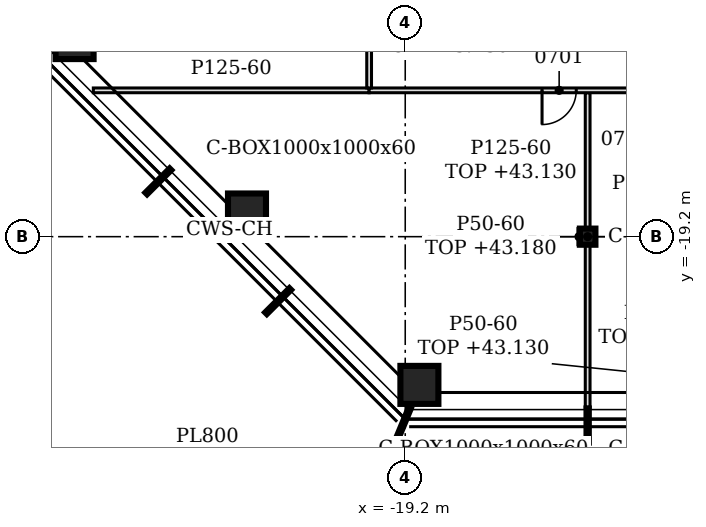
"""IFC4 building model, lengths in metres.
Left out: names, types, materials, properties, quantities, classifications, styles, units other than length and angle.
Written with IfcOpenShell. Run it as: python <this file> out.ifc"""

import sys

from ifc_helpers import new_model, si_unit, direction, frame, frame_2d, origin, origin_2d, place, context, subcontext, project, spatial, polyline, rectangle, hollow_rectangle, i_section, outline, extrude, element, fill, save


model = new_model("IFC4")
c1 = context("Model", 3, precision=1e-05, world=origin(), true_north=direction((0.0, 1.0)))
c2 = subcontext(c1, "Body", "Model", "MODEL_VIEW")
j1 = project(units=[si_unit("LENGTHUNIT", "METRE"), si_unit("PLANEANGLEUNIT", "RADIAN")], contexts=[c1])
p1 = place(None, origin())
s1 = spatial("IfcSite", under=j1, at=p1, CompositionType="ELEMENT")
p2 = place(p1, origin())
s2 = spatial("IfcBuilding", under=s1, at=p2, CompositionType="ELEMENT")
p3 = place(p2, frame((0.0, 0.0, 40.2)))
s3 = spatial("IfcBuildingStorey", under=s2, at=p3, CompositionType="ELEMENT", Elevation=40.2)
for number, where, z_axis, x_axis in (
    (1, (-18.827, -23.1, -0.15), (0.0, 0.0, 1.0), (1.0, 0.0, 0.0)),
    (2, (-27.9, -14.027, -0.15), (0.0, 0.0, 1.0), (1.0, 0.0, 0.0)),
    (3, (-23.364, -18.564, -0.15), (0.0, 0.0, 1.0), (1.0, 0.0, 0.0)),
):
    element("IfcColumn", number, at=place(p3, frame(where, z_axis=z_axis, x_axis=x_axis)), inside=s3, PredefinedType="COLUMN", context=c2, shape_type="SweptSolid", body=[
        extrude(hollow_rectangle(XDim=1.0, YDim=1.0, WallThickness=0.06, at=origin_2d()), origin(), (0.0, 0.0, 1.0), 3.6),
    ])
p4 = place(p3, frame((-14.4, -19.2, -0.15), z_axis=(0.0, 0.0, 1.0), x_axis=(1.0, 0.0, 0.0)))
e4 = element("IfcColumn", 4, at=p4, inside=s3, PredefinedType="COLUMN", context=c2, shape_type="SweptSolid", body=[
    extrude(i_section(OverallWidth=0.409, OverallDepth=0.425, WebThickness=0.033, FlangeThickness=0.052, FilletRadius=0.015, at=origin_2d()), origin(), (0.0, 0.0, 1.0), 3.6),
])
p5 = place(p3, frame((-14.4, -23.69, 0.0), z_axis=(0.0, 0.0, 1.0), x_axis=(0.0, 1.0, 0.0)))
e5 = element("IfcWall", 5, at=p5, inside=s3, PredefinedType="PARTITIONING", context=c2, shape_type="SweptSolid", body=[
    extrude(outline(polyline([(0.0, 0.0), (4.277, 0.0), (4.278, 3.03), (0.74, 3.03), (0.738, 2.93), (0.44, 2.93), (0.438, 3.03), (0.0, 3.03), (0.0, 0.0)])), frame((0.0, 0.062, 0.0), z_axis=(0.0, -1.0, 0.0), x_axis=(1.0, 0.0, 0.0)), (0.0, 0.0, 1.0), 0.125),
])
p6 = place(p3, frame((-14.4, -18.988, 0.0), z_axis=(0.0, 0.0, 1.0), x_axis=(0.0, 1.0, 0.0)))
e6 = element("IfcWall", 6, at=p6, inside=s3, PredefinedType="PARTITIONING", context=c2, shape_type="SweptSolid", body=[
    extrude(rectangle(XDim=3.575, YDim=0.125, at=frame_2d((1.788, 0.0))), origin(), (0.0, 0.0, 1.0), 2.93),
])
p7 = place(p3, frame((-27.407, -15.35, 0.0), z_axis=(0.0, 0.0, 1.0), x_axis=(1.0, 0.0, 0.0)))
e7 = element("IfcWall", 7, at=p7, inside=s3, PredefinedType="PARTITIONING", context=c2, shape_type="SweptSolid", body=[
    extrude(outline(polyline([(0.0, 0.0), (7.257, 0.0), (7.257, 3.45), (1.104, 3.45), (1.102, 2.93), (0.555, 2.93), (0.553, 3.45), (0.0, 3.45), (0.0, 0.0)])), frame((0.0, 0.062, 0.0), z_axis=(0.0, -1.0, 0.0), x_axis=(1.0, 0.0, 0.0)), (0.0, 0.0, 1.0), 0.125),
])
p8 = place(p3, frame((-20.15, -15.35, 0.0), z_axis=(0.0, 0.0, 1.0), x_axis=(1.0, 0.0, 0.0)))
e8 = element("IfcWall", 8, at=p8, inside=s3, PredefinedType="PARTITIONING", context=c2, shape_type="SweptSolid", body=[
    extrude(outline(polyline([(0.0, 0.0), (39.287, 0.0), (39.288, 2.73), (39.2, 2.73), (39.198, 3.45), (27.5, 3.45), (27.498, 2.73), (27.2, 2.73), (27.198, 3.45), (15.5, 3.45), (15.498, 2.73), (15.2, 2.73), (15.198, 3.45), (5.9, 3.45), (5.898, 2.93), (5.6, 2.93), (5.598, 3.45), (0.0, 3.45), (0.0, 0.0)])), frame((0.0, 0.062, 0.0), z_axis=(0.0, -1.0, 0.0), x_axis=(1.0, 0.0, 0.0)), (0.0, 0.0, 1.0), 0.125),
])
p9 = place(p8, frame((4.55, 0.0, 0.0)))
e9 = element("IfcOpeningElement", 9, at=p9, cuts=e8, PredefinedType="OPENING", context=c2, shape_type="SweptSolid", body=[
    extrude(rectangle(XDim=0.9, YDim=2.1, at=frame_2d((0.45, 1.05))), frame((0.0, 0.073, 0.0), z_axis=(0.0, -1.0, 0.0), x_axis=(1.0, 0.0, 0.0)), (0.0, 0.0, 1.0), 0.145),
])
p10 = place(p8, frame((7.136, 0.0, 0.0)))
e10 = element("IfcOpeningElement", 10, at=p10, cuts=e8, PredefinedType="OPENING", context=c2, shape_type="SweptSolid", body=[
    extrude(rectangle(XDim=0.9, YDim=2.1, at=frame_2d((0.45, 1.05))), frame((0.0, 0.073, 0.0), z_axis=(0.0, -1.0, 0.0), x_axis=(1.0, 0.0, 0.0)), (0.0, 0.0, 1.0), 0.145),
])
p11 = place(p8, frame((14.15, 0.0, 0.0)))
e11 = element("IfcOpeningElement", 11, at=p11, cuts=e8, PredefinedType="OPENING", context=c2, shape_type="SweptSolid", body=[
    extrude(rectangle(XDim=0.9, YDim=2.1, at=frame_2d((0.45, 1.05))), frame((0.0, 0.073, 0.0), z_axis=(0.0, -1.0, 0.0), x_axis=(1.0, 0.0, 0.0)), (0.0, 0.0, 1.0), 0.145),
])
p12 = place(p8, frame((16.55, 0.0, 0.0)))
e12 = element("IfcOpeningElement", 12, at=p12, cuts=e8, PredefinedType="OPENING", context=c2, shape_type="SweptSolid", body=[
    extrude(rectangle(XDim=0.9, YDim=2.1, at=frame_2d((0.45, 1.05))), frame((0.0, 0.073, 0.0), z_axis=(0.0, -1.0, 0.0), x_axis=(1.0, 0.0, 0.0)), (0.0, 0.0, 1.0), 0.145),
])
p13 = place(p8, frame((21.35, 0.0, 0.0)))
e13 = element("IfcOpeningElement", 13, at=p13, cuts=e8, PredefinedType="OPENING", context=c2, shape_type="SweptSolid", body=[
    extrude(rectangle(XDim=0.9, YDim=2.1, at=frame_2d((0.45, 1.05))), frame((0.0, 0.073, 0.0), z_axis=(0.0, -1.0, 0.0), x_axis=(1.0, 0.0, 0.0)), (0.0, 0.0, 1.0), 0.145),
])
p14 = place(p8, frame((28.364, 0.0, 0.0)))
e14 = element("IfcOpeningElement", 14, at=p14, cuts=e8, PredefinedType="OPENING", context=c2, shape_type="SweptSolid", body=[
    extrude(rectangle(XDim=0.9, YDim=2.1, at=frame_2d((0.45, 1.05))), frame((0.0, 0.073, 0.0), z_axis=(0.0, -1.0, 0.0), x_axis=(1.0, 0.0, 0.0)), (0.0, 0.0, 1.0), 0.145),
])
p15 = place(p8, frame((32.35, 0.0, 0.0)))
e15 = element("IfcOpeningElement", 15, at=p15, cuts=e8, PredefinedType="OPENING", context=c2, shape_type="SweptSolid", body=[
    extrude(rectangle(XDim=0.9, YDim=2.1, at=frame_2d((0.45, 1.05))), frame((0.0, 0.073, 0.0), z_axis=(0.0, -1.0, 0.0), x_axis=(1.0, 0.0, 0.0)), (0.0, 0.0, 1.0), 0.145),
])
p16 = place(p8, frame((37.35, 0.0, 0.0)))
e16 = element("IfcOpeningElement", 16, at=p16, cuts=e8, PredefinedType="OPENING", context=c2, shape_type="SweptSolid", body=[
    extrude(rectangle(XDim=0.9, YDim=2.1, at=frame_2d((0.45, 1.05))), frame((0.0, 0.073, 0.0), z_axis=(0.0, -1.0, 0.0), x_axis=(1.0, 0.0, 0.0)), (0.0, 0.0, 1.0), 0.145),
])
p17 = place(p3, frame((-20.15, -15.288, 0.0), z_axis=(0.0, 0.0, 1.0), x_axis=(0.0, 1.0, 0.0)))
e17 = element("IfcWall", 17, at=p17, inside=s3, PredefinedType="PARTITIONING", context=c2, shape_type="SweptSolid", body=[
    extrude(outline(polyline([(0.0, 0.0), (37.876, 0.0), (37.876, 3.45), (37.622, 3.45), (37.62, 2.63), (36.507, 2.63), (36.505, 3.45), (34.583, 3.45), (34.581, 2.98), (34.393, 2.98), (34.39, 3.45), (29.798, 3.45), (29.795, 2.83), (29.577, 2.83), (29.575, 3.45), (24.998, 3.45), (24.996, 2.83), (24.778, 2.83), (24.775, 3.45), (20.198, 3.45), (20.196, 2.83), (19.978, 2.83), (19.976, 3.45), (15.397, 3.45), (15.396, 2.83), (15.177, 2.83), (15.176, 3.45), (10.597, 3.45), (10.595, 2.83), (10.377, 2.83), (10.375, 3.45), (5.798, 3.45), (5.795, 2.83), (5.577, 2.83), (5.575, 3.45), (0.998, 3.45), (0.996, 2.83), (0.778, 2.83), (0.775, 3.45), (0.0, 3.45), (0.0, 0.0)])), frame((0.0, 0.062, 0.0), z_axis=(0.0, -1.0, 0.0), x_axis=(1.0, 0.0, 0.0)), (0.0, 0.0, 1.0), 0.125),
])
p18 = place(p17, frame((9.337, 0.0, 0.0)))
e18 = element("IfcOpeningElement", 18, at=p18, cuts=e17, PredefinedType="OPENING", context=c2, shape_type="SweptSolid", body=[
    extrude(rectangle(XDim=0.9, YDim=2.1, at=frame_2d((0.45, 1.05))), frame((0.0, 0.073, 0.0), z_axis=(0.0, -1.0, 0.0), x_axis=(1.0, 0.0, 0.0)), (0.0, 0.0, 1.0), 0.145),
])
p19 = place(p17, frame((10.912, 0.0, 0.0)))
e19 = element("IfcOpeningElement", 19, at=p19, cuts=e17, PredefinedType="OPENING", context=c2, shape_type="SweptSolid", body=[
    extrude(rectangle(XDim=0.9, YDim=2.1, at=frame_2d((0.45, 1.05))), frame((0.0, 0.073, 0.0), z_axis=(0.0, -1.0, 0.0), x_axis=(1.0, 0.0, 0.0)), (0.0, 0.0, 1.0), 0.145),
])
p20 = place(p17, frame((16.488, 0.0, 0.0)))
e20 = element("IfcOpeningElement", 20, at=p20, cuts=e17, PredefinedType="OPENING", context=c2, shape_type="SweptSolid", body=[
    extrude(rectangle(XDim=0.9, YDim=2.1, at=frame_2d((0.45, 1.05))), frame((0.0, 0.073, 0.0), z_axis=(0.0, -1.0, 0.0), x_axis=(1.0, 0.0, 0.0)), (0.0, 0.0, 1.0), 0.145),
])
p21 = place(p17, frame((23.664, 0.0, 0.0)))
e21 = element("IfcOpeningElement", 21, at=p21, cuts=e17, PredefinedType="OPENING", context=c2, shape_type="SweptSolid", body=[
    extrude(rectangle(XDim=0.9, YDim=2.1, at=frame_2d((0.45, 1.05))), frame((0.0, 0.073, 0.0), z_axis=(0.0, -1.0, 0.0), x_axis=(1.0, 0.0, 0.0)), (0.0, 0.0, 1.0), 0.145),
])
p22 = place(p17, frame((26.387, 0.0, 0.0)))
e22 = element("IfcOpeningElement", 22, at=p22, cuts=e17, PredefinedType="OPENING", context=c2, shape_type="SweptSolid", body=[
    extrude(rectangle(XDim=0.9, YDim=2.1, at=frame_2d((0.45, 1.05))), frame((0.0, 0.073, 0.0), z_axis=(0.0, -1.0, 0.0), x_axis=(1.0, 0.0, 0.0)), (0.0, 0.0, 1.0), 0.145),
])
p23 = place(p17, frame((29.615, 0.0, 0.0)))
e23 = element("IfcOpeningElement", 23, at=p23, cuts=e17, PredefinedType="OPENING", context=c2, shape_type="SweptSolid", body=[
    extrude(rectangle(XDim=0.9, YDim=2.1, at=frame_2d((0.45, 1.05))), frame((0.0, 0.073, 0.0), z_axis=(0.0, -1.0, 0.0), x_axis=(1.0, 0.0, 0.0)), (0.0, 0.0, 1.0), 0.145),
])
p24 = place(p3, frame((-14.629, -19.413, 0.0), z_axis=(0.0, 0.0, 1.0), x_axis=(0.0, 1.0, 0.0)))
e24 = element("IfcWall", 24, at=p24, inside=s3, PredefinedType="PARTITIONING", context=c2, shape_type="SweptSolid", body=[
    extrude(rectangle(XDim=0.425, YDim=0.05, at=frame_2d((0.212, 0.0))), origin(), (0.0, 0.0, 1.0), 2.98),
])
p25 = place(p9, frame((0.9, 0.0, 0.0), z_axis=(0.0, 0.0, 1.0), x_axis=(-1.0, 0.0, 0.0)))
e25 = element("IfcDoor", 25, at=p25, inside=s3, OperationType="SINGLE_SWING_RIGHT", PredefinedType="DOOR", context=c2, shape_type="SweptSolid", body=[
    extrude(rectangle(XDim=0.9, YDim=2.1, at=frame_2d((0.45, 1.05))), frame((0.0, 0.025, 0.0), z_axis=(0.0, -1.0, 0.0), x_axis=(1.0, 0.0, 0.0)), (0.0, 0.0, 1.0), 0.05),
])
fill(e9, e25)
save(model, sys.argv[1])
